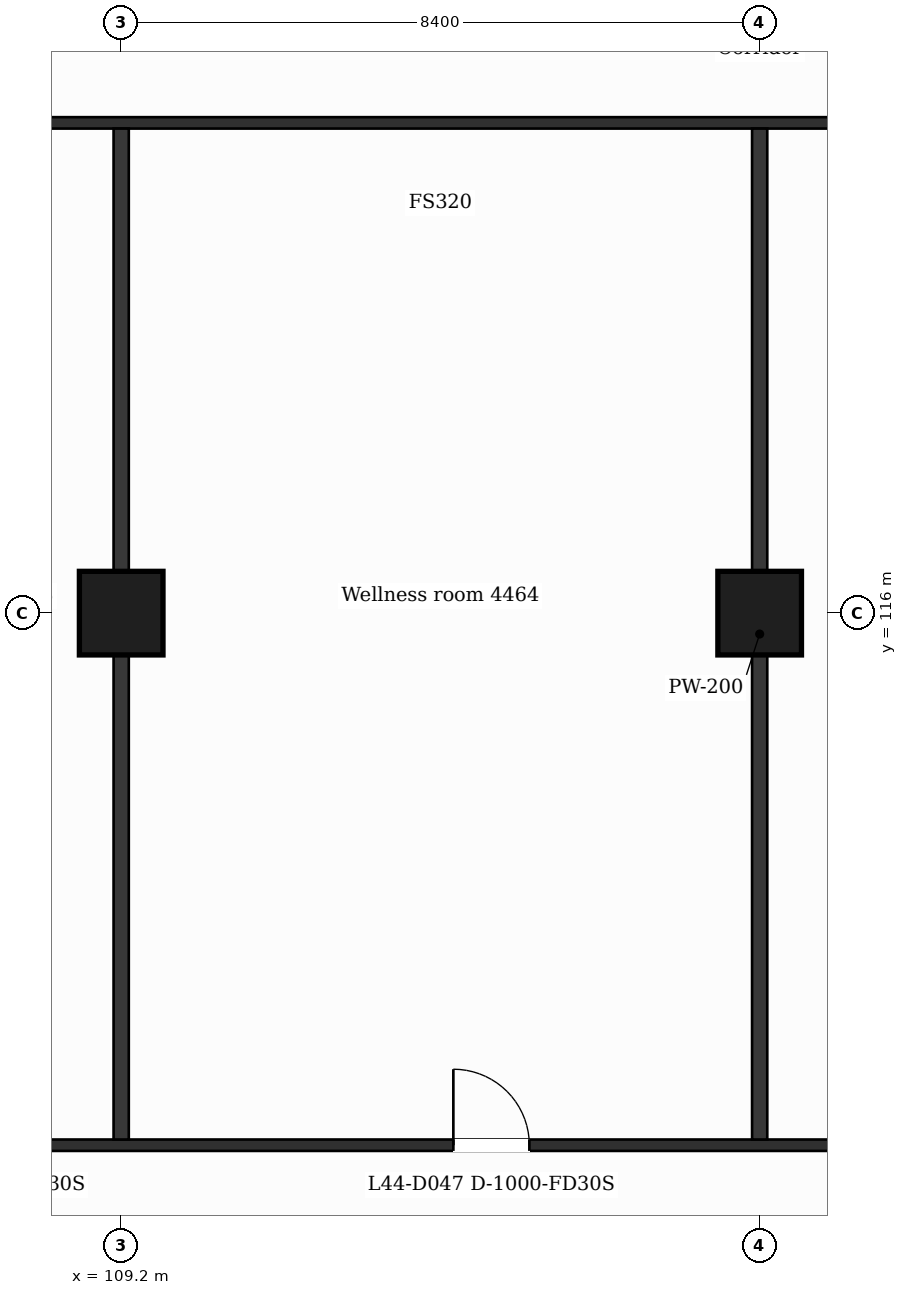
"""IFC4 building model, lengths in metres.
Left out: names, types, materials, properties, quantities, classifications, styles, units other than length and angle.
Written with IfcOpenShell. Run it as: python <this file> out.ifc"""

import sys

from ifc_helpers import new_model, si_unit, direction, frame, frame_2d, origin, origin_2d, place, context, subcontext, project, spatial, rectangle, extrude, element, fill, save


model = new_model("IFC4")
c1 = context("Model", 3, precision=1e-05, world=origin(), true_north=direction((0.0, 1.0)))
c2 = subcontext(c1, "Body", "Model", "MODEL_VIEW")
j1 = project(units=[si_unit("LENGTHUNIT", "METRE"), si_unit("PLANEANGLEUNIT", "RADIAN")], contexts=[c1])
p1 = place(None, origin())
s1 = spatial("IfcSite", under=j1, at=p1, CompositionType="ELEMENT")
p2 = place(p1, origin())
s2 = spatial("IfcBuilding", under=s1, at=p2, CompositionType="ELEMENT")
p3 = place(p2, frame((0.0, 0.0, 184.8)))
s3 = spatial("IfcBuildingStorey", under=s2, at=p3, CompositionType="ELEMENT", Elevation=184.8)
for number, where, z_axis, x_axis in (
    (1, (109.2, 116.0, 0.0), (0.0, 0.0, 1.0), (1.0, 0.0, 0.0)),
    (2, (117.6, 116.0, 0.0), (0.0, 0.0, 1.0), (1.0, 0.0, 0.0)),
):
    element("IfcColumn", number, at=place(p3, frame(where, z_axis=z_axis, x_axis=x_axis)), inside=s3, PredefinedType="COLUMN", context=c2, shape_type="SweptSolid", body=[
        extrude(rectangle(XDim=1.1, YDim=1.1, at=origin_2d()), origin(), (0.0, 0.0, 1.0), 3.7),
    ])
p4 = place(p3, frame((100.725, 109.0, 0.0), z_axis=(0.0, 0.0, 1.0), x_axis=(1.0, 0.0, 0.0)))
e3 = element("IfcWall", 3, at=p4, inside=s3, PredefinedType="PARTITIONING", context=c2, shape_type="SweptSolid", body=[
    extrude(rectangle(XDim=25.35, YDim=0.15, at=frame_2d((12.675, 0.0))), origin(), (0.0, 0.0, 1.0), 3.38),
])
p5 = place(p4, frame((1.925, 0.0, 0.0)))
e4 = element("IfcOpeningElement", 4, at=p5, cuts=e3, PredefinedType="OPENING", context=c2, shape_type="SweptSolid", body=[
    extrude(rectangle(XDim=1.0, YDim=2.1, at=frame_2d((0.5, 1.05))), frame((0.0, 0.085, 0.0), z_axis=(0.0, -1.0, 0.0), x_axis=(1.0, 0.0, 0.0)), (0.0, 0.0, 1.0), 0.17),
])
p6 = place(p4, frame((5.875, 0.0, 0.0)))
e5 = element("IfcOpeningElement", 5, at=p6, cuts=e3, PredefinedType="OPENING", context=c2, shape_type="SweptSolid", body=[
    extrude(rectangle(XDim=1.0, YDim=2.1, at=frame_2d((0.5, 1.05))), frame((0.0, 0.085, 0.0), z_axis=(0.0, -1.0, 0.0), x_axis=(1.0, 0.0, 0.0)), (0.0, 0.0, 1.0), 0.17),
])
p7 = place(p4, frame((12.845, 0.0, 0.0)))
e6 = element("IfcOpeningElement", 6, at=p7, cuts=e3, PredefinedType="OPENING", context=c2, shape_type="SweptSolid", body=[
    extrude(rectangle(XDim=1.0, YDim=2.1, at=frame_2d((0.5, 1.05))), frame((0.0, 0.085, 0.0), z_axis=(0.0, -1.0, 0.0), x_axis=(1.0, 0.0, 0.0)), (0.0, 0.0, 1.0), 0.17),
])
p8 = place(p4, frame((22.25, 0.0, 0.0)))
e7 = element("IfcOpeningElement", 7, at=p8, cuts=e3, PredefinedType="OPENING", context=c2, shape_type="SweptSolid", body=[
    extrude(rectangle(XDim=1.0, YDim=2.1, at=frame_2d((0.5, 1.05))), frame((0.0, 0.085, 0.0), z_axis=(0.0, -1.0, 0.0), x_axis=(1.0, 0.0, 0.0)), (0.0, 0.0, 1.0), 0.17),
])
p9 = place(p3, frame((100.8, 122.45, 0.0), z_axis=(0.0, 0.0, 1.0), x_axis=(1.0, 0.0, 0.0)))
e8 = element("IfcWall", 8, at=p9, inside=s3, PredefinedType="PARTITIONING", context=c2, shape_type="SweptSolid", body=[
    extrude(rectangle(XDim=25.2, YDim=0.15, at=frame_2d((12.6, 0.0))), origin(), (0.0, 0.0, 1.0), 3.38),
])
for number, where, z_axis, x_axis in (
    (9, (109.2, 109.075, 0.0), (0.0, 0.0, 1.0), (0.0, 1.0, 0.0)),
    (10, (117.6, 109.075, 0.0), (0.0, 0.0, 1.0), (0.0, 1.0, 0.0)),
):
    element("IfcWall", number, at=place(p3, frame(where, z_axis=z_axis, x_axis=x_axis)), inside=s3, PredefinedType="PARTITIONING", context=c2, shape_type="SweptSolid", body=[
        extrude(rectangle(XDim=13.3, YDim=0.2, at=frame_2d((6.65, 0.0))), origin(), (0.0, 0.0, 1.0), 3.38),
    ])
p10 = place(p7, origin())
e11 = element("IfcDoor", 11, at=p10, inside=s3, OperationType="SINGLE_SWING_LEFT", PredefinedType="DOOR", context=c2, shape_type="SweptSolid", body=[
    extrude(rectangle(XDim=1.0, YDim=2.1, at=frame_2d((0.5, 1.05))), frame((0.0, 0.025, 0.0), z_axis=(0.0, -1.0, 0.0), x_axis=(1.0, 0.0, 0.0)), (0.0, 0.0, 1.0), 0.05),
])
fill(e6, e11)
save(model, sys.argv[1])
